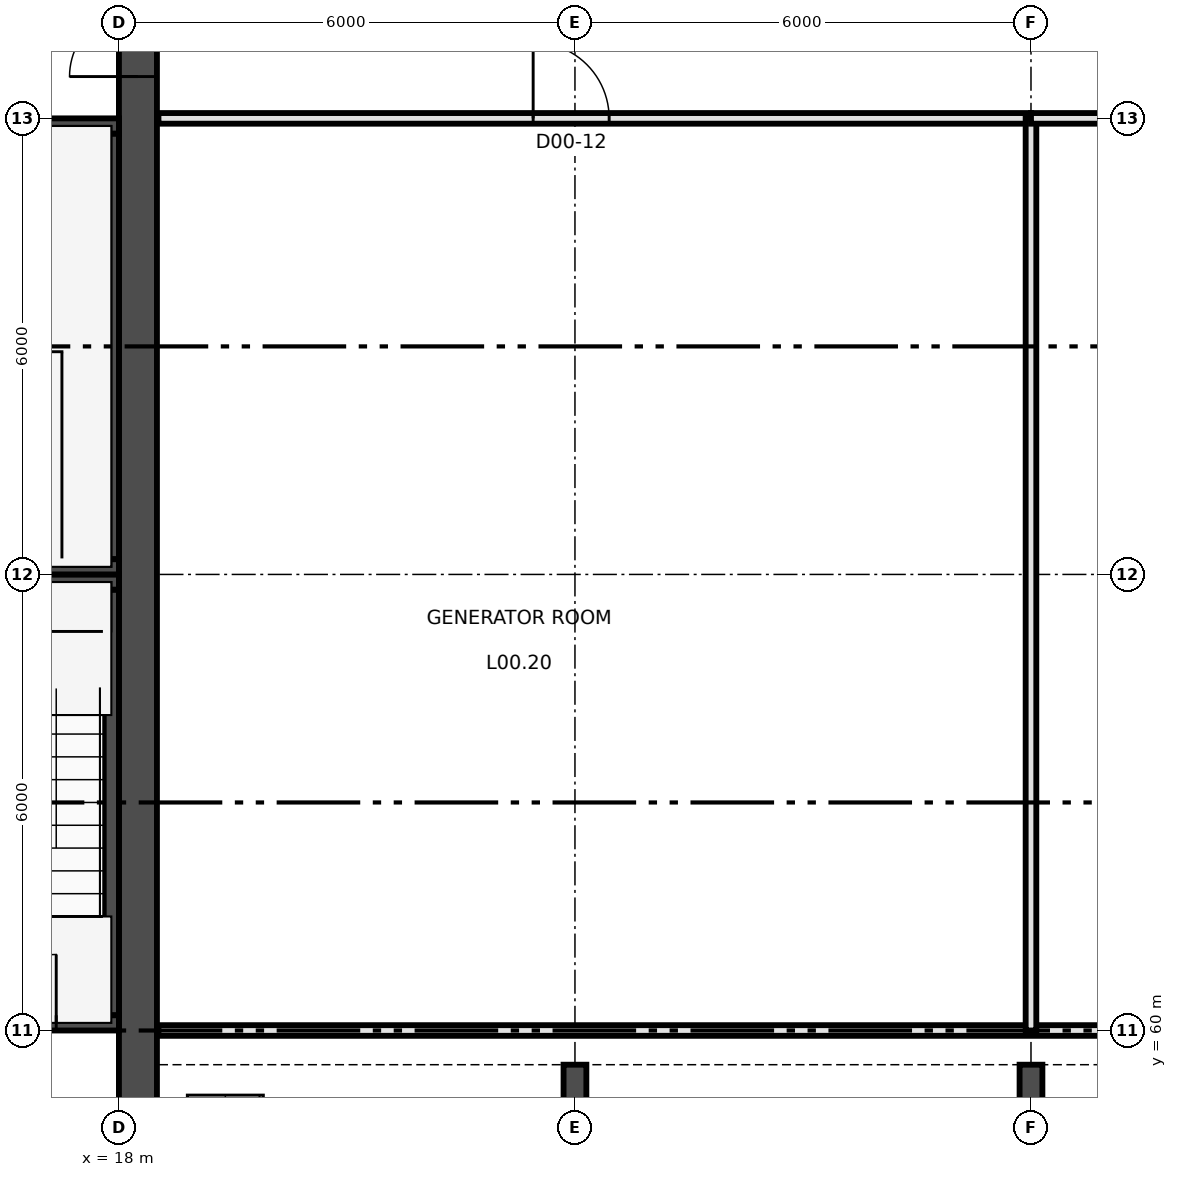
"""IFC4 building model, lengths in metres.
Left out: names, types, materials, properties, quantities, classifications, styles, units other than length and angle.
Written with IfcOpenShell. Run it as: python <this file> out.ifc"""

import sys

from ifc_helpers import new_model, si_unit, direction, frame, frame_2d, origin, place, context, subcontext, project, spatial, rectangle, extrude, element, fill, save


model = new_model("IFC4")
c1 = context("Model", 3, precision=1e-05, world=origin(), true_north=direction((0.0, 1.0)))
c2 = subcontext(c1, "Body", "Model", "MODEL_VIEW")
j1 = project(units=[si_unit("LENGTHUNIT", "METRE"), si_unit("PLANEANGLEUNIT", "RADIAN")], contexts=[c1])
p1 = place(None, origin())
s1 = spatial("IfcSite", under=j1, at=p1, CompositionType="ELEMENT")
p2 = place(p1, origin())
s2 = spatial("IfcBuilding", under=s1, at=p2, CompositionType="ELEMENT")
p3 = place(p2, origin())
s3 = spatial("IfcBuildingStorey", under=s2, at=p3, CompositionType="ELEMENT", Elevation=0.0)
p4 = place(p3, frame((12.0, 71.9, -0.3), z_axis=(0.0, 0.0, 1.0), x_axis=(1.0, 0.0, 0.0)))
e1 = element("IfcWall", 1, at=p4, inside=s3, PredefinedType="SHEAR", context=c2, shape_type="SweptSolid", body=[
    extrude(rectangle(XDim=6.0, YDim=0.2, at=frame_2d((3.0, 0.0))), origin(), (0.0, 0.0, 1.0), 7.3),
])
p5 = place(p4, frame((0.3, 0.0, 0.3)))
e2 = element("IfcOpeningElement", 2, at=p5, cuts=e1, PredefinedType="OPENING", context=c2, shape_type="SweptSolid", body=[
    extrude(rectangle(XDim=1.1, YDim=2.2, at=frame_2d((0.55, 1.1))), frame((0.0, 0.11, 0.0), z_axis=(0.0, -1.0, 0.0), x_axis=(1.0, 0.0, 0.0)), (0.0, 0.0, 1.0), 0.22),
])
p6 = place(p3, frame((12.0, 66.1, -0.3), z_axis=(0.0, 0.0, 1.0), x_axis=(1.0, 0.0, 0.0)))
e3 = element("IfcWall", 3, at=p6, inside=s3, PredefinedType="SHEAR", context=c2, shape_type="SweptSolid", body=[
    extrude(rectangle(XDim=6.0, YDim=0.2, at=frame_2d((3.0, 0.0))), origin(), (0.0, 0.0, 1.0), 7.3),
])
p7 = place(p3, frame((17.9, 66.2, -0.3), z_axis=(0.0, 0.0, 1.0), x_axis=(0.0, 1.0, 0.0)))
e4 = element("IfcWall", 4, at=p7, inside=s3, PredefinedType="SHEAR", context=c2, shape_type="SweptSolid", body=[
    extrude(rectangle(XDim=5.6, YDim=0.2, at=frame_2d((2.8, 0.0))), origin(), (0.0, 0.0, 1.0), 7.3),
])
p8 = place(p3, frame((12.0, 65.9, -0.3), z_axis=(0.0, 0.0, 1.0), x_axis=(1.0, 0.0, 0.0)))
e5 = element("IfcWall", 5, at=p8, inside=s3, PredefinedType="SHEAR", context=c2, shape_type="SweptSolid", body=[
    extrude(rectangle(XDim=6.0, YDim=0.2, at=frame_2d((3.0, 0.0))), origin(), (0.0, 0.0, 1.0), 7.3),
])
p9 = place(p3, frame((12.0, 60.1, -0.3), z_axis=(0.0, 0.0, 1.0), x_axis=(1.0, 0.0, 0.0)))
e6 = element("IfcWall", 6, at=p9, inside=s3, PredefinedType="SHEAR", context=c2, shape_type="SweptSolid", body=[
    extrude(rectangle(XDim=6.0, YDim=0.2, at=frame_2d((3.0, 0.0))), origin(), (0.0, 0.0, 1.0), 7.3),
])
p10 = place(p9, frame((3.375, 0.0, 0.3)))
e7 = element("IfcOpeningElement", 7, at=p10, cuts=e6, PredefinedType="OPENING", context=c2, shape_type="SweptSolid", body=[
    extrude(rectangle(XDim=1.8, YDim=2.2, at=frame_2d((0.9, 1.1))), frame((0.0, 0.11, 0.0), z_axis=(0.0, -1.0, 0.0), x_axis=(1.0, 0.0, 0.0)), (0.0, 0.0, 1.0), 0.22),
])
p11 = place(p3, frame((17.9, 60.2, -0.3), z_axis=(0.0, 0.0, 1.0), x_axis=(0.0, 1.0, 0.0)))
e8 = element("IfcWall", 8, at=p11, inside=s3, PredefinedType="SHEAR", context=c2, shape_type="SweptSolid", body=[
    extrude(rectangle(XDim=5.6, YDim=0.2, at=frame_2d((2.8, 0.0))), origin(), (0.0, 0.0, 1.0), 7.3),
])
p12 = place(p3, frame((18.25, 54.5, -0.3), z_axis=(0.0, 0.0, 1.0), x_axis=(0.0, 1.0, 0.0)))
e9 = element("IfcWall", 9, at=p12, inside=s3, PredefinedType="SHEAR", context=c2, shape_type="SweptSolid", body=[
    extrude(rectangle(XDim=35.5, YDim=0.5, at=frame_2d((17.75, 0.0))), origin(), (0.0, 0.0, 1.0), 7.3),
])
p13 = place(p12, frame((1.55, 0.0, 0.3)))
e10 = element("IfcOpeningElement", 10, at=p13, cuts=e9, PredefinedType="OPENING", context=c2, shape_type="SweptSolid", body=[
    extrude(rectangle(XDim=1.8, YDim=2.1, at=frame_2d((0.9, 1.05))), frame((0.0, 0.26, 0.0), z_axis=(0.0, -1.0, 0.0), x_axis=(1.0, 0.0, 0.0)), (0.0, 0.0, 1.0), 0.52),
])
p14 = place(p12, frame((18.05, 0.0, 0.3)))
e11 = element("IfcOpeningElement", 11, at=p14, cuts=e9, PredefinedType="OPENING", context=c2, shape_type="SweptSolid", body=[
    extrude(rectangle(XDim=1.8, YDim=2.1, at=frame_2d((0.9, 1.05))), frame((0.0, 0.26, 0.0), z_axis=(0.0, -1.0, 0.0), x_axis=(1.0, 0.0, 0.0)), (0.0, 0.0, 1.0), 0.52),
])
for number, where, z_axis, x_axis in (
    (12, (24.0, 54.5, -0.3), (0.0, 0.0, 1.0), (0.0, 1.0, 0.0)),
    (13, (30.0, 54.5, -0.3), (0.0, 0.0, 1.0), (0.0, 1.0, 0.0)),
):
    element("IfcWall", number, at=place(p3, frame(where, z_axis=z_axis, x_axis=x_axis)), inside=s3, PredefinedType="SHEAR", context=c2, shape_type="SweptSolid", body=[
        extrude(rectangle(XDim=5.05, YDim=0.3, at=frame_2d((2.525, 0.0))), origin(), (0.0, 0.0, 1.0), 4.0),
    ])
p15 = place(p3, frame((18.52, 60.0, 0.0), z_axis=(0.0, 0.0, 1.0), x_axis=(1.0, 0.0, 0.0)))
e14 = element("IfcWall", 14, at=p15, inside=s3, PredefinedType="PARTITIONING", context=c2, shape_type="SweptSolid", body=[
    extrude(rectangle(XDim=28.96, YDim=0.14, at=frame_2d((14.48, 0.0))), origin(), (0.0, 0.0, 1.0), 2.964),
])
p16 = place(p3, frame((18.52, 72.0, 0.0), z_axis=(0.0, 0.0, 1.0), x_axis=(1.0, 0.0, 0.0)))
e15 = element("IfcWall", 15, at=p16, inside=s3, PredefinedType="PARTITIONING", context=c2, shape_type="SweptSolid", body=[
    extrude(rectangle(XDim=11.48, YDim=0.14, at=frame_2d((5.74, 0.0))), origin(), (0.0, 0.0, 1.0), 3.924),
])
p17 = place(p16, frame((4.93, 0.0, 0.0)))
e16 = element("IfcOpeningElement", 16, at=p17, cuts=e15, PredefinedType="OPENING", context=c2, shape_type="SweptSolid", body=[
    extrude(rectangle(XDim=1.0, YDim=2.1, at=frame_2d((0.5, 1.05))), frame((0.0, 0.08, 0.0), z_axis=(0.0, -1.0, 0.0), x_axis=(1.0, 0.0, 0.0)), (0.0, 0.0, 1.0), 0.16),
])
p18 = place(p3, frame((30.0, 60.0, 0.0), z_axis=(0.0, 0.0, 1.0), x_axis=(0.0, 1.0, 0.0)))
e17 = element("IfcWall", 17, at=p18, inside=s3, PredefinedType="PARTITIONING", context=c2, shape_type="SweptSolid", body=[
    extrude(rectangle(XDim=12.0, YDim=0.14, at=frame_2d((6.0, 0.0))), origin(), (0.0, 0.0, 1.0), 2.964),
])
p19 = place(p3, frame((30.0, 72.0, 0.0), z_axis=(0.0, 0.0, 1.0), x_axis=(1.0, 0.0, 0.0)))
e18 = element("IfcWall", 18, at=p19, inside=s3, PredefinedType="PARTITIONING", context=c2, shape_type="SweptSolid", body=[
    extrude(rectangle(XDim=9.0, YDim=0.14, at=frame_2d((4.5, 0.0))), origin(), (0.0, 0.0, 1.0), 3.924),
])
p20 = place(p19, frame((3.95, 0.0, 0.0)))
e19 = element("IfcOpeningElement", 19, at=p20, cuts=e18, PredefinedType="OPENING", context=c2, shape_type="SweptSolid", body=[
    extrude(rectangle(XDim=1.0, YDim=2.1, at=frame_2d((0.5, 1.05))), frame((0.0, 0.08, 0.0), z_axis=(0.0, -1.0, 0.0), x_axis=(1.0, 0.0, 0.0)), (0.0, 0.0, 1.0), 0.16),
])
p21 = place(p17, frame((1.0, 0.0, 0.0), z_axis=(0.0, 0.0, 1.0), x_axis=(-1.0, 0.0, 0.0)))
e20 = element("IfcDoor", 20, at=p21, inside=s3, OperationType="SINGLE_SWING_LEFT", PredefinedType="DOOR", context=c2, shape_type="SweptSolid", body=[
    extrude(rectangle(XDim=1.0, YDim=2.1, at=frame_2d((0.5, 1.05))), frame((0.0, 0.025, 0.0), z_axis=(0.0, -1.0, 0.0), x_axis=(1.0, 0.0, 0.0)), (0.0, 0.0, 1.0), 0.05),
])
fill(e16, e20)
p22 = place(p10, origin())
e21 = element("IfcDoor", 21, at=p22, inside=s3, OperationType="DOUBLE_DOOR_SINGLE_SWING", PredefinedType="DOOR", context=c2, shape_type="SweptSolid", body=[
    extrude(rectangle(XDim=1.8, YDim=2.2, at=frame_2d((0.9, 1.1))), frame((0.0, 0.025, 0.0), z_axis=(0.0, -1.0, 0.0), x_axis=(1.0, 0.0, 0.0)), (0.0, 0.0, 1.0), 0.05),
])
fill(e7, e21)
p23 = place(p14, frame((1.8, 0.0, 0.0), z_axis=(0.0, 0.0, 1.0), x_axis=(-1.0, 0.0, 0.0)))
e22 = element("IfcDoor", 22, at=p23, inside=s3, OperationType="DOUBLE_DOOR_SINGLE_SWING", PredefinedType="DOOR", context=c2, shape_type="SweptSolid", body=[
    extrude(rectangle(XDim=1.8, YDim=2.1, at=frame_2d((0.9, 1.05))), frame((0.0, 0.025, 0.0), z_axis=(0.0, -1.0, 0.0), x_axis=(1.0, 0.0, 0.0)), (0.0, 0.0, 1.0), 0.05),
])
fill(e11, e22)
save(model, sys.argv[1])
